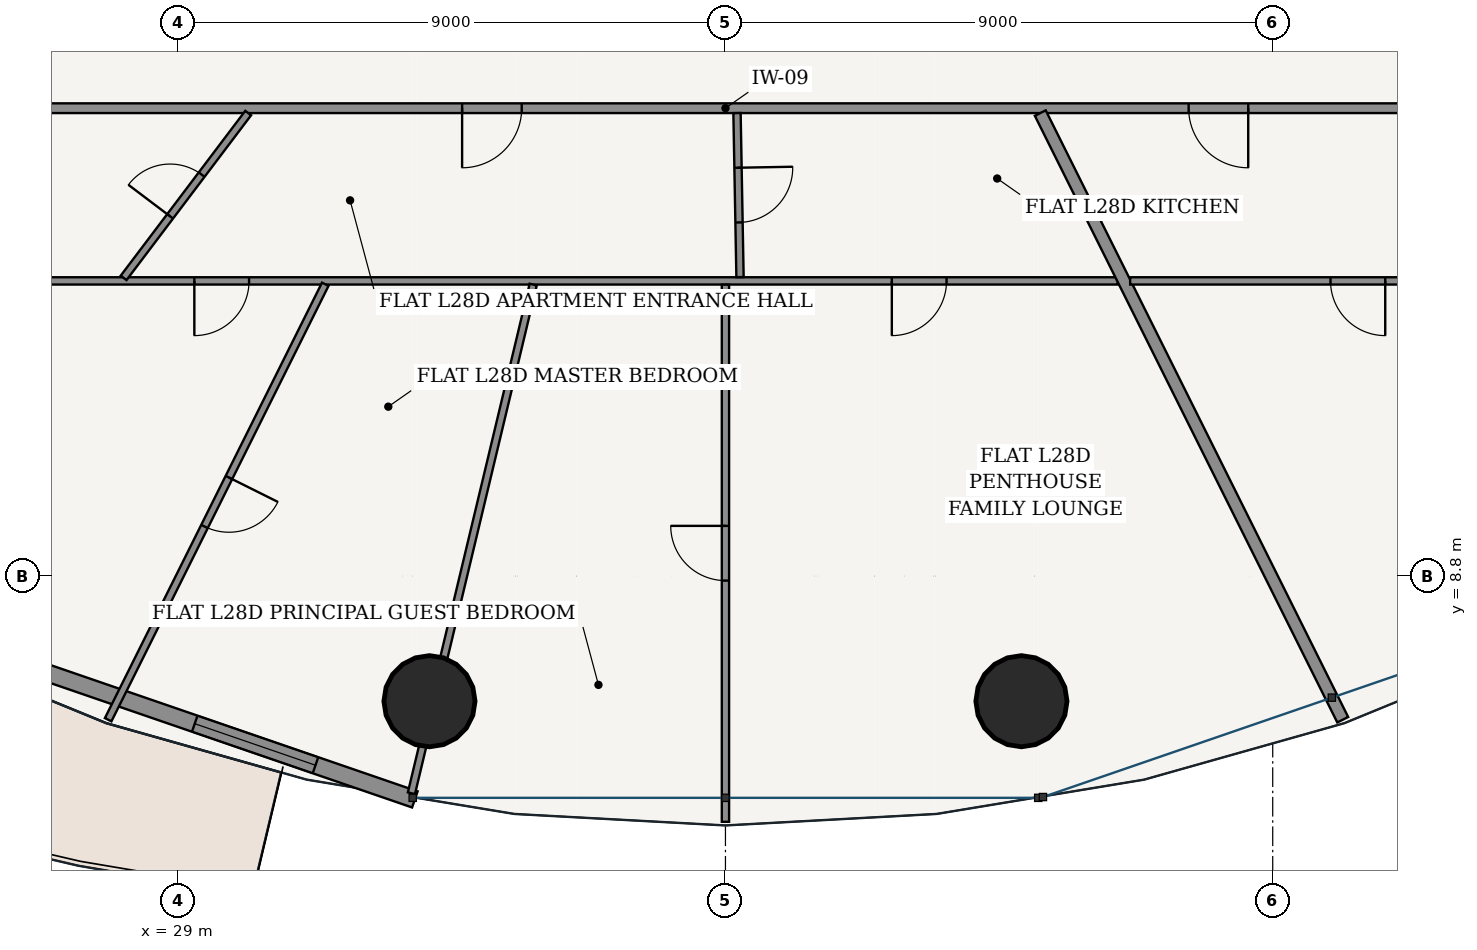
"""IFC4 building model, lengths in metres.
Left out: names, types, materials, properties, quantities, classifications, styles, units other than length and angle.
Written with IfcOpenShell. Run it as: python <this file> out.ifc"""

import sys

from ifc_helpers import new_model, si_unit, direction, frame, frame_2d, origin, origin_2d, place, context, subcontext, project, spatial, rectangle, hollow_circle, extrude, source, transform, mapped, element, fill, save


model = new_model("IFC4")
c1 = context("Model", 3, precision=1e-05, world=origin(), true_north=direction((-0.2419218956, 0.970295726276)))
c2 = subcontext(c1, "Body", "Model", "MODEL_VIEW")
j1 = project(units=[si_unit("LENGTHUNIT", "METRE"), si_unit("PLANEANGLEUNIT", "RADIAN")], contexts=[c1])
p1 = place(None, origin())
s1 = spatial("IfcSite", under=j1, at=p1, CompositionType="ELEMENT")
p2 = place(p1, origin())
s2 = spatial("IfcBuilding", under=s1, at=p2, CompositionType="ELEMENT")
p3 = place(p2, frame((0.0, 0.0, 108.6)))
s3 = spatial("IfcBuildingStorey", under=s2, at=p3, CompositionType="ELEMENT", Elevation=108.6)
for number, where, z_axis, x_axis in (
    (1, (33.133, 6.743, 0.0), (0.0, 0.0, 1.0), (1.0, 0.0, 0.0)),
    (2, (42.867, 6.743, 0.0), (0.0, 0.0, 1.0), (1.0, 0.0, 0.0)),
):
    element("IfcColumn", number, at=place(p3, frame(where, z_axis=z_axis, x_axis=x_axis)), inside=s3, PredefinedType="COLUMN", context=c2, shape_type="SweptSolid", body=[
        extrude(hollow_circle(Radius=0.75, WallThickness=0.045, at=origin_2d()), origin(), (0.0, 0.0, 1.0), 3.6),
    ])
p4 = place(p3, frame((23.163, 8.476, 0.0), z_axis=(0.0, 0.0, 1.0), x_axis=(0.945590132341, -0.325360264351, 0.0)))
e3 = element("IfcWall", 3, at=p4, inside=s3, PredefinedType="SOLIDWALL", context=c2, shape_type="SweptSolid", body=[
    extrude(rectangle(XDim=10.289, YDim=0.28, at=frame_2d((5.145, 0.0))), origin(), (0.0, 0.0, 1.0), 3.325),
])
p5 = place(p4, frame((1.728, 0.0, 0.85)))
e4 = element("IfcOpeningElement", 4, at=p5, cuts=e3, PredefinedType="OPENING", context=c2, shape_type="SweptSolid", body=[
    extrude(rectangle(XDim=2.1, YDim=1.95, at=frame_2d((1.05, 0.975))), frame((0.0, 0.15, 0.0), z_axis=(0.0, -1.0, 0.0), x_axis=(1.0, 0.0, 0.0)), (0.0, 0.0, 1.0), 0.3),
])
p6 = place(p4, frame((6.461, 0.0, 0.85)))
e5 = element("IfcOpeningElement", 5, at=p6, cuts=e3, PredefinedType="OPENING", context=c2, shape_type="SweptSolid", body=[
    extrude(rectangle(XDim=2.1, YDim=1.95, at=frame_2d((1.05, 0.975))), frame((0.0, 0.15, 0.0), z_axis=(0.0, -1.0, 0.0), x_axis=(1.0, 0.0, 0.0)), (0.0, 0.0, 1.0), 0.3),
])
p7 = place(p3, frame((26.695, 16.495, 0.0), z_axis=(0.0, 0.0, 1.0), x_axis=(1.0, 0.0, 0.0)))
e6 = element("IfcWall", 6, at=p7, inside=s3, PredefinedType="PARTITIONING", context=c2, shape_type="SweptSolid", body=[
    extrude(rectangle(XDim=22.61, YDim=0.16, at=frame_2d((11.305, 0.0))), origin(), (0.0, 0.0, 1.0), 2.767),
])
p8 = place(p7, frame((6.974, 0.0, 0.0)))
e7 = element("IfcOpeningElement", 7, at=p8, cuts=e6, PredefinedType="OPENING", context=c2, shape_type="SweptSolid", body=[
    extrude(rectangle(XDim=0.98, YDim=2.2, at=frame_2d((0.49, 1.1))), frame((0.0, 0.09, 0.0), z_axis=(0.0, -1.0, 0.0), x_axis=(1.0, 0.0, 0.0)), (0.0, 0.0, 1.0), 0.18),
])
p9 = place(p7, frame((18.922, 0.0, 0.0)))
e8 = element("IfcOpeningElement", 8, at=p9, cuts=e6, PredefinedType="OPENING", context=c2, shape_type="SweptSolid", body=[
    extrude(rectangle(XDim=0.98, YDim=2.2, at=frame_2d((0.49, 1.1))), frame((0.0, 0.09, 0.0), z_axis=(0.0, -1.0, 0.0), x_axis=(1.0, 0.0, 0.0)), (0.0, 0.0, 1.0), 0.18),
])
p10 = place(p3, frame((44.451, 13.655, 0.0), z_axis=(0.0, 0.0, 1.0), x_axis=(-1.0, 0.0, 0.0)))
e9 = element("IfcWall", 9, at=p10, inside=s3, PredefinedType="PARTITIONING", context=c2, shape_type="SweptSolid", body=[
    extrude(rectangle(XDim=20.596, YDim=0.12, at=frame_2d((10.298, 0.0))), origin(), (0.0, 0.0, 1.0), 2.767),
])
p11 = place(p10, frame((14.286, 0.0, 0.0)))
e10 = element("IfcOpeningElement", 10, at=p11, cuts=e9, PredefinedType="OPENING", context=c2, shape_type="SweptSolid", body=[
    extrude(rectangle(XDim=0.9, YDim=2.15, at=frame_2d((0.45, 1.075))), frame((0.0, 0.07, 0.0), z_axis=(0.0, -1.0, 0.0), x_axis=(1.0, 0.0, 0.0)), (0.0, 0.0, 1.0), 0.14),
])
p12 = place(p10, frame((2.815, 0.0, 0.0)))
e11 = element("IfcOpeningElement", 11, at=p12, cuts=e9, PredefinedType="OPENING", context=c2, shape_type="SweptSolid", body=[
    extrude(rectangle(XDim=0.9, YDim=2.15, at=frame_2d((0.45, 1.075))), frame((0.0, 0.07, 0.0), z_axis=(0.0, -1.0, 0.0), x_axis=(1.0, 0.0, 0.0)), (0.0, 0.0, 1.0), 0.14),
])
p13 = place(p3, frame((31.419, 13.6, 0.0), z_axis=(0.0, 0.0, 1.0), x_axis=(-0.446188142997, -0.894939182877, 0.0)))
e12 = element("IfcWall", 12, at=p13, inside=s3, PredefinedType="PARTITIONING", context=c2, shape_type="SweptSolid", body=[
    extrude(rectangle(XDim=8.002, YDim=0.12, at=frame_2d((4.001, 0.0))), origin(), (0.0, 0.0, 1.0), 2.767),
])
p14 = place(p13, frame((3.551, 0.0, 0.0)))
e13 = element("IfcOpeningElement", 13, at=p14, cuts=e12, PredefinedType="OPENING", context=c2, shape_type="SweptSolid", body=[
    extrude(rectangle(XDim=0.9, YDim=2.15, at=frame_2d((0.45, 1.075))), frame((0.0, 0.07, 0.0), z_axis=(0.0, -1.0, 0.0), x_axis=(1.0, 0.0, 0.0)), (0.0, 0.0, 1.0), 0.14),
])
p15 = place(p3, frame((34.838, 13.595, 0.0), z_axis=(0.0, 0.0, 1.0), x_axis=(-0.232820082337, -0.972519824611, 0.0)))
e14 = element("IfcWall", 14, at=p15, inside=s3, PredefinedType="PARTITIONING", context=c2, shape_type="SweptSolid", body=[
    extrude(rectangle(XDim=8.602, YDim=0.12, at=frame_2d((4.301, 0.0))), origin(), (0.0, 0.0, 1.0), 2.767),
])
p16 = place(p3, frame((38.0, 13.593, 0.0), z_axis=(0.0, 0.0, 1.0), x_axis=(0.0, -1.0, 0.0)))
e15 = element("IfcWall", 15, at=p16, inside=s3, PredefinedType="PARTITIONING", context=c2, shape_type="SweptSolid", body=[
    extrude(rectangle(XDim=8.833, YDim=0.12, at=frame_2d((4.417, 0.0))), origin(), (0.0, 0.0, 1.0), 2.767),
])
p17 = place(p16, frame((3.967, 0.0, 0.0)))
e16 = element("IfcOpeningElement", 16, at=p17, cuts=e15, PredefinedType="OPENING", context=c2, shape_type="SweptSolid", body=[
    extrude(rectangle(XDim=0.9, YDim=2.15, at=frame_2d((0.45, 1.075))), frame((0.0, 0.07, 0.0), z_axis=(0.0, -1.0, 0.0), x_axis=(1.0, 0.0, 0.0)), (0.0, 0.0, 1.0), 0.14),
])
p18 = place(p3, frame((30.151, 16.415, 0.0), z_axis=(0.0, 0.0, 1.0), x_axis=(-0.602927617913, -0.79779589342, 0.0)))
e17 = element("IfcWall", 17, at=p18, inside=s3, PredefinedType="PARTITIONING", context=c2, shape_type="SweptSolid", body=[
    extrude(rectangle(XDim=3.398, YDim=0.12, at=frame_2d((1.699, 0.0))), origin(), (0.0, 0.0, 1.0), 3.004),
])
p19 = place(p18, frame((1.269, 0.0, 0.0)))
e18 = element("IfcOpeningElement", 18, at=p19, cuts=e17, PredefinedType="OPENING", context=c2, shape_type="SweptSolid", body=[
    extrude(rectangle(XDim=0.86, YDim=2.15, at=frame_2d((0.43, 1.075))), frame((0.0, 0.07, 0.0), z_axis=(0.0, -1.0, 0.0), x_axis=(1.0, 0.0, 0.0)), (0.0, 0.0, 1.0), 0.14),
])
p20 = place(p3, frame((38.19, 16.415, 0.0), z_axis=(0.0, 0.0, 1.0), x_axis=(0.018275835903, -0.999832982964, 0.0)))
e19 = element("IfcWall", 19, at=p20, inside=s3, PredefinedType="PARTITIONING", context=c2, shape_type="SweptSolid", body=[
    extrude(rectangle(XDim=2.698, YDim=0.12, at=frame_2d((1.349, 0.0))), origin(), (0.0, 0.0, 1.0), 3.325),
])
p21 = place(p20, frame((0.899, 0.0, 0.0)))
e20 = element("IfcOpeningElement", 20, at=p21, cuts=e19, PredefinedType="OPENING", context=c2, shape_type="SweptSolid", body=[
    extrude(rectangle(XDim=0.9, YDim=2.15, at=frame_2d((0.45, 1.075))), frame((0.0, 0.07, 0.0), z_axis=(0.0, -1.0, 0.0), x_axis=(1.0, 0.0, 0.0)), (0.0, 0.0, 1.0), 0.14),
])
p22 = place(p3, frame((43.177, 16.415, 0.0), z_axis=(0.0, 0.0, 1.0), x_axis=(0.446179591598, -0.894943446281, 0.0)))
e21 = element("IfcWall", 21, at=p22, inside=s3, PredefinedType="PARTITIONING", context=c2, shape_type="SweptSolid", body=[
    extrude(rectangle(XDim=11.148, YDim=0.2, at=frame_2d((5.574, 0.0))), origin(), (0.0, 0.0, 1.0), 2.767),
])
p23 = place(p3, frame((52.145, 13.655, 0.0), z_axis=(0.0, 0.0, 1.0), x_axis=(-1.0, 0.0, 0.0)))
e22 = element("IfcWall", 22, at=p23, inside=s3, PredefinedType="PARTITIONING", context=c2, shape_type="SweptSolid", body=[
    extrude(rectangle(XDim=7.49, YDim=0.12, at=frame_2d((3.745, 0.0))), origin(), (0.0, 0.0, 1.0), 2.767),
])
p24 = place(p23, frame((3.295, 0.0, 0.0)))
e23 = element("IfcOpeningElement", 23, at=p24, cuts=e22, PredefinedType="OPENING", context=c2, shape_type="SweptSolid", body=[
    extrude(rectangle(XDim=0.9, YDim=2.15, at=frame_2d((0.45, 1.075))), frame((0.0, 0.07, 0.0), z_axis=(0.0, -1.0, 0.0), x_axis=(1.0, 0.0, 0.0)), (0.0, 0.0, 1.0), 0.14),
])
m1 = source(origin(), c2, "Body", "SweptSolid", [
    extrude(rectangle(XDim=2.1, YDim=1.95, at=frame_2d((1.05, 0.975))), frame((0.0, 0.03, 0.0), z_axis=(0.0, -1.0, 0.0), x_axis=(1.0, 0.0, 0.0)), (0.0, 0.0, 1.0), 0.06),
])
p25 = place(p6, origin())
e24 = element("IfcWindow", 24, at=p25, inside=s3, PartitioningType="SINGLE_PANEL", PredefinedType="WINDOW", context=c2, shape_type="MappedRepresentation", body=[
    mapped(m1, transform((0.0, 0.0, 0.0), scale=1.0)),
])
fill(e5, e24)
m2 = source(origin(), c2, "Body", "SweptSolid", [
    extrude(rectangle(XDim=0.98, YDim=2.2, at=frame_2d((0.49, 1.1))), frame((0.0, 0.025, 0.0), z_axis=(0.0, -1.0, 0.0), x_axis=(1.0, 0.0, 0.0)), (0.0, 0.0, 1.0), 0.05),
])
p26 = place(p8, frame((0.98, 0.0, 0.0), z_axis=(0.0, 0.0, 1.0), x_axis=(-1.0, 0.0, 0.0)))
e25 = element("IfcDoor", 25, at=p26, inside=s3, OperationType="SINGLE_SWING_RIGHT", PredefinedType="DOOR", context=c2, shape_type="MappedRepresentation", body=[
    mapped(m2, transform((0.0, 0.0, 0.0), scale=1.0)),
])
fill(e7, e25)
m3 = source(origin(), c2, "Body", "SweptSolid", [
    extrude(rectangle(XDim=0.86, YDim=2.15, at=frame_2d((0.43, 1.075))), frame((0.0, 0.025, 0.0), z_axis=(0.0, -1.0, 0.0), x_axis=(1.0, 0.0, 0.0)), (0.0, 0.0, 1.0), 0.05),
])
p27 = place(p19, frame((0.86, 0.0, 0.0), z_axis=(0.0, 0.0, 1.0), x_axis=(-1.0, 0.0, 0.0)))
e26 = element("IfcDoor", 26, at=p27, inside=s3, OperationType="SINGLE_SWING_LEFT", PredefinedType="DOOR", context=c2, shape_type="MappedRepresentation", body=[
    mapped(m3, transform((0.0, 0.0, 0.0), scale=1.0)),
])
fill(e18, e26)
m4 = source(origin(), c2, "Body", "SweptSolid", [
    extrude(rectangle(XDim=0.9, YDim=2.15, at=frame_2d((0.45, 1.075))), frame((0.0, 0.025, 0.0), z_axis=(0.0, -1.0, 0.0), x_axis=(1.0, 0.0, 0.0)), (0.0, 0.0, 1.0), 0.05),
])
p28 = place(p11, origin())
e27 = element("IfcDoor", 27, at=p28, inside=s3, OperationType="SINGLE_SWING_RIGHT", PredefinedType="DOOR", context=c2, shape_type="MappedRepresentation", body=[
    mapped(m4, transform((0.0, 0.0, 0.0), scale=1.0)),
])
fill(e10, e27)
p29 = place(p21, origin())
e28 = element("IfcDoor", 28, at=p29, inside=s3, OperationType="SINGLE_SWING_LEFT", PredefinedType="DOOR", context=c2, shape_type="MappedRepresentation", body=[
    mapped(m4, transform((0.0, 0.0, 0.0), scale=1.0)),
])
fill(e20, e28)
p30 = place(p12, origin())
e29 = element("IfcDoor", 29, at=p30, inside=s3, OperationType="SINGLE_SWING_RIGHT", PredefinedType="DOOR", context=c2, shape_type="MappedRepresentation", body=[
    mapped(m4, transform((0.0, 0.0, 0.0), scale=1.0)),
])
fill(e11, e29)
p31 = place(p14, origin())
e30 = element("IfcDoor", 30, at=p31, inside=s3, OperationType="SINGLE_SWING_LEFT", PredefinedType="DOOR", context=c2, shape_type="MappedRepresentation", body=[
    mapped(m4, transform((0.0, 0.0, 0.0), scale=1.0)),
])
fill(e13, e30)
p32 = place(p17, frame((0.9, 0.0, 0.0), z_axis=(0.0, 0.0, 1.0), x_axis=(-1.0, 0.0, 0.0)))
e31 = element("IfcDoor", 31, at=p32, inside=s3, OperationType="SINGLE_SWING_RIGHT", PredefinedType="DOOR", context=c2, shape_type="MappedRepresentation", body=[
    mapped(m4, transform((0.0, 0.0, 0.0), scale=1.0)),
])
fill(e16, e31)
p33 = place(p9, frame((0.98, 0.0, 0.0), z_axis=(0.0, 0.0, 1.0), x_axis=(-1.0, 0.0, 0.0)))
e32 = element("IfcDoor", 32, at=p33, inside=s3, OperationType="SINGLE_SWING_LEFT", PredefinedType="DOOR", context=c2, shape_type="MappedRepresentation", body=[
    mapped(m2, transform((0.0, 0.0, 0.0), scale=1.0)),
])
fill(e8, e32)
p34 = place(p24, origin())
e33 = element("IfcDoor", 33, at=p34, inside=s3, OperationType="SINGLE_SWING_LEFT", PredefinedType="DOOR", context=c2, shape_type="MappedRepresentation", body=[
    mapped(m4, transform((0.0, 0.0, 0.0), scale=1.0)),
])
fill(e23, e33)
save(model, sys.argv[1])
